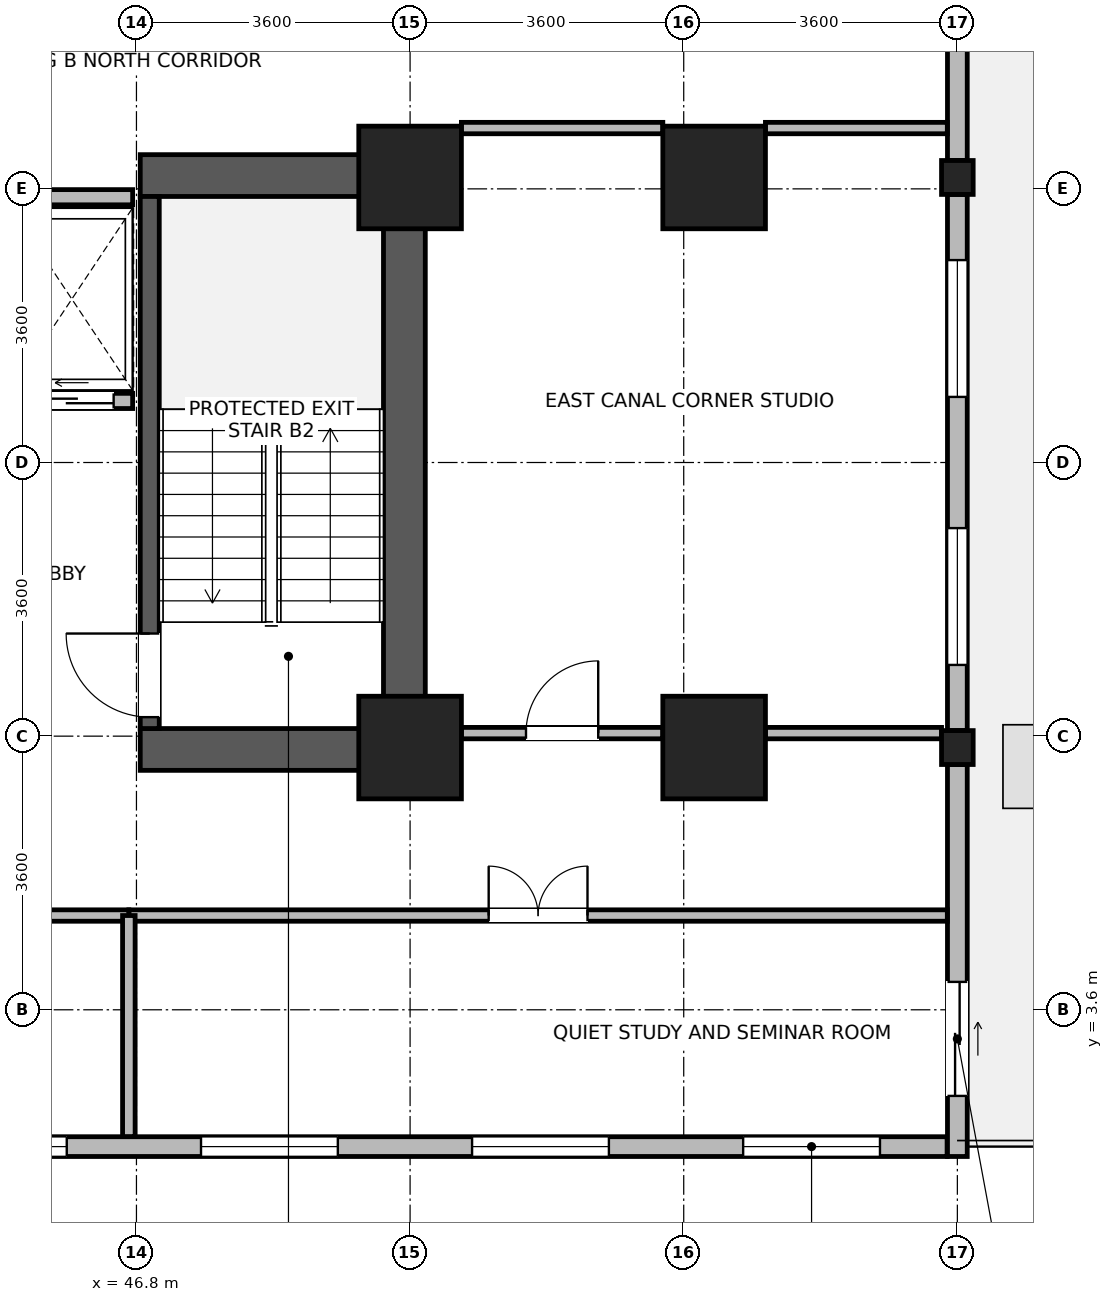
"""IFC4 building model, lengths in metres.
Left out: names, types, materials, properties, quantities, classifications, styles, units other than length and angle.
Written with IfcOpenShell. Run it as: python <this file> out.ifc"""

import sys

from ifc_helpers import new_model, si_unit, direction, frame, frame_2d, origin, origin_2d, place, context, subcontext, project, spatial, rectangle, i_section, extrude, source, transform, mapped, element, fill, save


model = new_model("IFC4")
c1 = context("Model", 3, precision=1e-05, world=origin(), true_north=direction((0.0, 1.0)))
c2 = subcontext(c1, "Body", "Model", "MODEL_VIEW")
j1 = project(units=[si_unit("LENGTHUNIT", "METRE"), si_unit("PLANEANGLEUNIT", "RADIAN")], contexts=[c1])
p1 = place(None, origin())
s1 = spatial("IfcSite", under=j1, at=p1, CompositionType="ELEMENT")
p2 = place(p1, origin())
s2 = spatial("IfcBuilding", under=s1, at=p2, CompositionType="ELEMENT")
p3 = place(p2, frame((0.0, 0.0, 47.5)))
s3 = spatial("IfcBuildingStorey", under=s2, at=p3, CompositionType="ELEMENT", Elevation=47.5)
p4 = place(p3, frame((50.325, 6.75, 0.0), z_axis=(0.0, 0.0, 1.0), x_axis=(0.0, 1.0, 0.0)))
e1 = element("IfcWall", 1, at=p4, inside=s3, PredefinedType="SHEAR", context=c2, shape_type="SweptSolid", body=[
    extrude(rectangle(XDim=8.1, YDim=0.55, at=frame_2d((4.05, 0.0))), origin(), (0.0, 0.0, 1.0), 3.45),
])
for number, where, z_axis, x_axis in (
    (2, (46.85, 7.025, 0.0), (0.0, 0.0, 1.0), (1.0, 0.0, 0.0)),
    (3, (46.85, 14.575, 0.0), (0.0, 0.0, 1.0), (1.0, 0.0, 0.0)),
):
    element("IfcWall", number, at=place(p3, frame(where, z_axis=z_axis, x_axis=x_axis)), inside=s3, PredefinedType="SHEAR", context=c2, shape_type="SweptSolid", body=[
        extrude(rectangle(XDim=3.2, YDim=0.55, at=frame_2d((1.6, 0.0))), origin(), (0.0, 0.0, 1.0), 3.45),
    ])
p5 = place(p3, frame((46.975, 7.3, 0.0), z_axis=(0.0, 0.0, 1.0), x_axis=(0.0, 1.0, 0.0)))
e4 = element("IfcWall", 4, at=p5, inside=s3, PredefinedType="SHEAR", context=c2, shape_type="SweptSolid", body=[
    extrude(rectangle(XDim=7.0, YDim=0.25, at=frame_2d((3.5, 0.0))), origin(), (0.0, 0.0, 1.0), 3.45),
])
p6 = place(p5, frame((0.15, 0.0, 0.0)))
e5 = element("IfcOpeningElement", 5, at=p6, cuts=e4, PredefinedType="OPENING", context=c2, shape_type="SweptSolid", body=[
    extrude(rectangle(XDim=1.1, YDim=2.08, at=frame_2d((0.55, 1.04))), frame((0.0, 0.135, 0.0), z_axis=(0.0, -1.0, 0.0), x_axis=(1.0, 0.0, 0.0)), (0.0, 0.0, 1.0), 0.27),
])
m1 = source(origin(), c2, "Body", "SweptSolid", [
    extrude(rectangle(XDim=1.35, YDim=1.35, at=origin_2d()), origin(), (0.0, 0.0, 1.0), 3.7),
])
for number, where, z_axis, x_axis in (
    (6, (50.4, 7.05, 0.0), (0.0, 0.0, 1.0), (1.0, 0.0, 0.0)),
    (7, (50.4, 14.55, 0.0), (0.0, 0.0, 1.0), (1.0, 0.0, 0.0)),
    (8, (54.4, 7.05, 0.0), (0.0, 0.0, 1.0), (1.0, 0.0, 0.0)),
    (9, (54.4, 14.55, 0.0), (0.0, 0.0, 1.0), (1.0, 0.0, 0.0)),
):
    element("IfcColumn", number, at=place(p3, frame(where, z_axis=z_axis, x_axis=x_axis)), inside=s3, PredefinedType="COLUMN", context=c2, shape_type="MappedRepresentation", body=[
        mapped(m1, transform((0.0, 0.0, 0.0), x_axis=(1.0, 0.0, 0.0), y_axis=(0.0, 1.0, 0.0), z_axis=(0.0, 0.0, 1.0), scale=1.0)),
    ])
m2 = source(origin(), c2, "Body", "SweptSolid", [
    extrude(i_section(OverallWidth=0.416, OverallDepth=0.446, WebThickness=0.029, FlangeThickness=0.04, FilletRadius=0.015, at=origin_2d()), origin(), (0.0, 0.0, 1.0), 3.7),
])
for number, where, z_axis, x_axis in (
    (10, (57.6, 7.05, 0.0), (0.0, 0.0, 1.0), (1.0, 0.0, 0.0)),
    (11, (57.6, 14.55, 0.0), (0.0, 0.0, 1.0), (1.0, 0.0, 0.0)),
):
    element("IfcColumn", number, at=place(p3, frame(where, z_axis=z_axis, x_axis=x_axis)), inside=s3, PredefinedType="COLUMN", context=c2, shape_type="MappedRepresentation", body=[
        mapped(m2, transform((0.0, 0.0, 0.0), x_axis=(1.0, 0.0, 0.0), y_axis=(0.0, 1.0, 0.0), z_axis=(0.0, 0.0, 1.0), scale=1.0)),
    ])
p7 = place(p3, frame((57.465, 1.8, 0.0), z_axis=(0.0, 0.0, 1.0), x_axis=(-1.0, 0.0, 0.0)))
e12 = element("IfcWall", 12, at=p7, inside=s3, PredefinedType="STANDARD", context=c2, shape_type="SweptSolid", body=[
    extrude(rectangle(XDim=28.53, YDim=0.26, at=frame_2d((14.265, 0.0))), origin(), (0.0, 0.0, 1.0), 3.43),
])
p8 = place(p7, frame((0.883, 0.0, 0.85)))
e13 = element("IfcOpeningElement", 13, at=p8, cuts=e12, PredefinedType="OPENING", context=c2, shape_type="SweptSolid", body=[
    extrude(rectangle(XDim=1.8, YDim=1.85, at=frame_2d((0.9, 0.925))), frame((0.0, 0.14, 0.0), z_axis=(0.0, -1.0, 0.0), x_axis=(1.0, 0.0, 0.0)), (0.0, 0.0, 1.0), 0.28),
])
p9 = place(p7, frame((4.449, 0.0, 0.85)))
e14 = element("IfcOpeningElement", 14, at=p9, cuts=e12, PredefinedType="OPENING", context=c2, shape_type="SweptSolid", body=[
    extrude(rectangle(XDim=1.8, YDim=1.85, at=frame_2d((0.9, 0.925))), frame((0.0, 0.14, 0.0), z_axis=(0.0, -1.0, 0.0), x_axis=(1.0, 0.0, 0.0)), (0.0, 0.0, 1.0), 0.28),
])
p10 = place(p7, frame((8.016, 0.0, 0.85)))
e15 = element("IfcOpeningElement", 15, at=p10, cuts=e12, PredefinedType="OPENING", context=c2, shape_type="SweptSolid", body=[
    extrude(rectangle(XDim=1.8, YDim=1.85, at=frame_2d((0.9, 0.925))), frame((0.0, 0.14, 0.0), z_axis=(0.0, -1.0, 0.0), x_axis=(1.0, 0.0, 0.0)), (0.0, 0.0, 1.0), 0.28),
])
p11 = place(p7, frame((11.582, 0.0, 0.85)))
e16 = element("IfcOpeningElement", 16, at=p11, cuts=e12, PredefinedType="OPENING", context=c2, shape_type="SweptSolid", body=[
    extrude(rectangle(XDim=1.8, YDim=1.85, at=frame_2d((0.9, 0.925))), frame((0.0, 0.14, 0.0), z_axis=(0.0, -1.0, 0.0), x_axis=(1.0, 0.0, 0.0)), (0.0, 0.0, 1.0), 0.28),
])
p12 = place(p7, frame((15.148, 0.0, 0.85)))
e17 = element("IfcOpeningElement", 17, at=p12, cuts=e12, PredefinedType="OPENING", context=c2, shape_type="SweptSolid", body=[
    extrude(rectangle(XDim=1.8, YDim=1.85, at=frame_2d((0.9, 0.925))), frame((0.0, 0.14, 0.0), z_axis=(0.0, -1.0, 0.0), x_axis=(1.0, 0.0, 0.0)), (0.0, 0.0, 1.0), 0.28),
])
p13 = place(p7, frame((22.281, 0.0, 0.85)))
e18 = element("IfcOpeningElement", 18, at=p13, cuts=e12, PredefinedType="OPENING", context=c2, shape_type="SweptSolid", body=[
    extrude(rectangle(XDim=1.8, YDim=1.85, at=frame_2d((0.9, 0.925))), frame((0.0, 0.14, 0.0), z_axis=(0.0, -1.0, 0.0), x_axis=(1.0, 0.0, 0.0)), (0.0, 0.0, 1.0), 0.28),
])
p14 = place(p7, frame((25.847, 0.0, 0.85)))
e19 = element("IfcOpeningElement", 19, at=p14, cuts=e12, PredefinedType="OPENING", context=c2, shape_type="SweptSolid", body=[
    extrude(rectangle(XDim=1.8, YDim=1.85, at=frame_2d((0.9, 0.925))), frame((0.0, 0.14, 0.0), z_axis=(0.0, -1.0, 0.0), x_axis=(1.0, 0.0, 0.0)), (0.0, 0.0, 1.0), 0.28),
])
p15 = place(p3, frame((57.6, 6.826, 0.0), z_axis=(0.0, 0.0, 1.0), x_axis=(0.0, -1.0, 0.0)))
e20 = element("IfcWall", 20, at=p15, inside=s3, PredefinedType="STANDARD", context=c2, shape_type="SweptSolid", body=[
    extrude(rectangle(XDim=5.156, YDim=0.26, at=frame_2d((2.578, 0.0))), origin(), (0.0, 0.0, 1.0), 3.43),
])
p16 = place(p15, frame((2.859, 0.0, 0.0)))
e21 = element("IfcOpeningElement", 21, at=p16, cuts=e20, PredefinedType="OPENING", context=c2, shape_type="SweptSolid", body=[
    extrude(rectangle(XDim=1.5, YDim=2.15, at=frame_2d((0.75, 1.075))), frame((0.0, 0.14, 0.0), z_axis=(0.0, -1.0, 0.0), x_axis=(1.0, 0.0, 0.0)), (0.0, 0.0, 1.0), 0.28),
])
p17 = place(p3, frame((57.6, 14.326, 0.0), z_axis=(0.0, 0.0, 1.0), x_axis=(0.0, -1.0, 0.0)))
e22 = element("IfcWall", 22, at=p17, inside=s3, PredefinedType="STANDARD", context=c2, shape_type="SweptSolid", body=[
    extrude(rectangle(XDim=7.052, YDim=0.26, at=frame_2d((3.526, 0.0))), origin(), (0.0, 0.0, 1.0), 2.93),
])
p18 = place(p17, frame((0.863, 0.0, 0.85)))
e23 = element("IfcOpeningElement", 23, at=p18, cuts=e22, PredefinedType="OPENING", context=c2, shape_type="SweptSolid", body=[
    extrude(rectangle(XDim=1.8, YDim=1.85, at=frame_2d((0.9, 0.925))), frame((0.0, 0.14, 0.0), z_axis=(0.0, -1.0, 0.0), x_axis=(1.0, 0.0, 0.0)), (0.0, 0.0, 1.0), 0.28),
])
p19 = place(p17, frame((4.389, 0.0, 0.85)))
e24 = element("IfcOpeningElement", 24, at=p19, cuts=e22, PredefinedType="OPENING", context=c2, shape_type="SweptSolid", body=[
    extrude(rectangle(XDim=1.8, YDim=1.85, at=frame_2d((0.9, 0.925))), frame((0.0, 0.14, 0.0), z_axis=(0.0, -1.0, 0.0), x_axis=(1.0, 0.0, 0.0)), (0.0, 0.0, 1.0), 0.28),
])
p20 = place(p3, frame((57.6, 21.376, 0.0), z_axis=(0.0, 0.0, 1.0), x_axis=(0.0, -1.0, 0.0)))
e25 = element("IfcWall", 25, at=p20, inside=s3, PredefinedType="STANDARD", context=c2, shape_type="SweptSolid", body=[
    extrude(rectangle(XDim=6.602, YDim=0.26, at=frame_2d((3.301, 0.0))), origin(), (0.0, 0.0, 1.0), 2.93),
])
p21 = place(p20, frame((0.75, 0.0, 0.85)))
e26 = element("IfcOpeningElement", 26, at=p21, cuts=e25, PredefinedType="OPENING", context=c2, shape_type="SweptSolid", body=[
    extrude(rectangle(XDim=1.8, YDim=1.85, at=frame_2d((0.9, 0.925))), frame((0.0, 0.14, 0.0), z_axis=(0.0, -1.0, 0.0), x_axis=(1.0, 0.0, 0.0)), (0.0, 0.0, 1.0), 0.28),
])
p22 = place(p3, frame((45.15, 11.61, 0.0), z_axis=(0.0, 0.0, 1.0), x_axis=(1.0, 0.0, 0.0)))
e27 = element("IfcWall", 27, at=p22, inside=s3, PredefinedType="PARTITIONING", context=c2, shape_type="SweptSolid", body=[
    extrude(rectangle(XDim=1.6, YDim=0.2, at=frame_2d((0.8, 0.0))), origin(), (0.0, 0.0, 1.0), 3.43),
])
p23 = place(p22, frame((0.25, 0.0, 0.0)))
e28 = element("IfcOpeningElement", 28, at=p23, cuts=e27, PredefinedType="OPENING", context=c2, shape_type="SweptSolid", body=[
    extrude(rectangle(XDim=1.1, YDim=2.12, at=frame_2d((0.55, 1.06))), frame((0.0, 0.11, 0.0), z_axis=(0.0, -1.0, 0.0), x_axis=(1.0, 0.0, 0.0)), (0.0, 0.0, 1.0), 0.22),
])
p24 = place(p3, frame((45.15, 14.29, 0.0), z_axis=(0.0, 0.0, 1.0), x_axis=(1.0, 0.0, 0.0)))
e29 = element("IfcWall", 29, at=p24, inside=s3, PredefinedType="PARTITIONING", context=c2, shape_type="SweptSolid", body=[
    extrude(rectangle(XDim=1.6, YDim=0.2, at=frame_2d((0.8, 0.0))), origin(), (0.0, 0.0, 1.0), 2.23),
])
p25 = place(p3, frame((46.7, 4.84, 0.0), z_axis=(0.0, 0.0, 1.0), x_axis=(1.0, 0.0, 0.0)))
e30 = element("IfcWall", 30, at=p25, inside=s3, PredefinedType="PARTITIONING", context=c2, shape_type="SweptSolid", body=[
    extrude(rectangle(XDim=10.768, YDim=0.15, at=frame_2d((5.384, 0.0))), origin(), (0.0, 0.0, 1.0), 3.43),
])
p26 = place(p25, frame((4.734, 0.0, 0.0)))
e31 = element("IfcOpeningElement", 31, at=p26, cuts=e30, PredefinedType="OPENING", context=c2, shape_type="SweptSolid", body=[
    extrude(rectangle(XDim=1.3, YDim=2.12, at=frame_2d((0.65, 1.06))), frame((0.0, 0.085, 0.0), z_axis=(0.0, -1.0, 0.0), x_axis=(1.0, 0.0, 0.0)), (0.0, 0.0, 1.0), 0.17),
])
p27 = place(p3, frame((37.5, 4.84, 0.0), z_axis=(0.0, 0.0, 1.0), x_axis=(1.0, 0.0, 0.0)))
e32 = element("IfcWall", 32, at=p27, inside=s3, PredefinedType="PARTITIONING", context=c2, shape_type="SweptSolid", body=[
    extrude(rectangle(XDim=9.2, YDim=0.15, at=frame_2d((4.6, 0.0))), origin(), (0.0, 0.0, 1.0), 3.43),
])
p28 = place(p27, frame((4.125, 0.0, 0.0)))
e33 = element("IfcOpeningElement", 33, at=p28, cuts=e32, PredefinedType="OPENING", context=c2, shape_type="SweptSolid", body=[
    extrude(rectangle(XDim=0.95, YDim=2.1, at=frame_2d((0.475, 1.05))), frame((0.0, 0.085, 0.0), z_axis=(0.0, -1.0, 0.0), x_axis=(1.0, 0.0, 0.0)), (0.0, 0.0, 1.0), 0.17),
])
p29 = place(p3, frame((51.075, 7.24, 0.0), z_axis=(0.0, 0.0, 1.0), x_axis=(1.0, 0.0, 0.0)))
e34 = element("IfcWall", 34, at=p29, inside=s3, PredefinedType="PARTITIONING", context=c2, shape_type="SweptSolid", body=[
    extrude(rectangle(XDim=2.65, YDim=0.15, at=frame_2d((1.325, 0.0))), origin(), (0.0, 0.0, 1.0), 2.78),
])
p30 = place(p29, frame((0.85, 0.0, 0.0)))
e35 = element("IfcOpeningElement", 35, at=p30, cuts=e34, PredefinedType="OPENING", context=c2, shape_type="SweptSolid", body=[
    extrude(rectangle(XDim=0.95, YDim=2.1, at=frame_2d((0.475, 1.05))), frame((0.0, 0.085, 0.0), z_axis=(0.0, -1.0, 0.0), x_axis=(1.0, 0.0, 0.0)), (0.0, 0.0, 1.0), 0.17),
])
p31 = place(p3, frame((55.075, 7.24, 0.0), z_axis=(0.0, 0.0, 1.0), x_axis=(1.0, 0.0, 0.0)))
e36 = element("IfcWall", 36, at=p31, inside=s3, PredefinedType="PARTITIONING", context=c2, shape_type="SweptSolid", body=[
    extrude(rectangle(XDim=2.317, YDim=0.15, at=frame_2d((1.159, 0.0))), origin(), (0.0, 0.0, 1.0), 2.78),
])
p32 = place(p3, frame((51.075, 15.2, 0.0), z_axis=(0.0, 0.0, 1.0), x_axis=(1.0, 0.0, 0.0)))
e37 = element("IfcWall", 37, at=p32, inside=s3, PredefinedType="PARTITIONING", context=c2, shape_type="SweptSolid", body=[
    extrude(rectangle(XDim=2.65, YDim=0.15, at=frame_2d((1.325, 0.0))), origin(), (0.0, 0.0, 1.0), 3.43),
])
p33 = place(p3, frame((55.075, 15.2, 0.0), z_axis=(0.0, 0.0, 1.0), x_axis=(1.0, 0.0, 0.0)))
e38 = element("IfcWall", 38, at=p33, inside=s3, PredefinedType="PARTITIONING", context=c2, shape_type="SweptSolid", body=[
    extrude(rectangle(XDim=2.393, YDim=0.15, at=frame_2d((1.197, 0.0))), origin(), (0.0, 0.0, 1.0), 3.43),
])
p34 = place(p3, frame((46.7, 1.932, 0.0), z_axis=(0.0, 0.0, 1.0), x_axis=(0.0, 1.0, 0.0)))
e39 = element("IfcWall", 39, at=p34, inside=s3, PredefinedType="PARTITIONING", context=c2, shape_type="SweptSolid", body=[
    extrude(rectangle(XDim=2.908, YDim=0.165, at=frame_2d((1.454, 0.0))), origin(), (0.0, 0.0, 1.0), 3.43),
])
p35 = place(p8, origin())
e40 = element("IfcWindow", 40, at=p35, inside=s3, PartitioningType="SINGLE_PANEL", PredefinedType="WINDOW", context=c2, shape_type="SweptSolid", body=[
    extrude(rectangle(XDim=1.8, YDim=1.85, at=frame_2d((0.9, 0.925))), frame((0.0, 0.03, 0.0), z_axis=(0.0, -1.0, 0.0), x_axis=(1.0, 0.0, 0.0)), (0.0, 0.0, 1.0), 0.06),
])
fill(e13, e40)
p36 = place(p9, origin())
e41 = element("IfcWindow", 41, at=p36, inside=s3, PartitioningType="SINGLE_PANEL", PredefinedType="WINDOW", context=c2, shape_type="SweptSolid", body=[
    extrude(rectangle(XDim=1.8, YDim=1.85, at=frame_2d((0.9, 0.925))), frame((0.0, 0.03, 0.0), z_axis=(0.0, -1.0, 0.0), x_axis=(1.0, 0.0, 0.0)), (0.0, 0.0, 1.0), 0.06),
])
fill(e14, e41)
p37 = place(p10, origin())
e42 = element("IfcWindow", 42, at=p37, inside=s3, PartitioningType="SINGLE_PANEL", PredefinedType="WINDOW", context=c2, shape_type="SweptSolid", body=[
    extrude(rectangle(XDim=1.8, YDim=1.85, at=frame_2d((0.9, 0.925))), frame((0.0, 0.03, 0.0), z_axis=(0.0, -1.0, 0.0), x_axis=(1.0, 0.0, 0.0)), (0.0, 0.0, 1.0), 0.06),
])
fill(e15, e42)
p38 = place(p11, origin())
e43 = element("IfcWindow", 43, at=p38, inside=s3, PartitioningType="SINGLE_PANEL", PredefinedType="WINDOW", context=c2, shape_type="SweptSolid", body=[
    extrude(rectangle(XDim=1.8, YDim=1.85, at=frame_2d((0.9, 0.925))), frame((0.0, 0.03, 0.0), z_axis=(0.0, -1.0, 0.0), x_axis=(1.0, 0.0, 0.0)), (0.0, 0.0, 1.0), 0.06),
])
fill(e16, e43)
p39 = place(p16, origin())
e44 = element("IfcDoor", 44, at=p39, inside=s3, OperationType="SLIDING_TO_LEFT", PredefinedType="DOOR", context=c2, shape_type="SweptSolid", body=[
    extrude(rectangle(XDim=1.5, YDim=2.15, at=frame_2d((0.75, 1.075))), frame((0.0, 0.025, 0.0), z_axis=(0.0, -1.0, 0.0), x_axis=(1.0, 0.0, 0.0)), (0.0, 0.0, 1.0), 0.05),
])
fill(e21, e44)
p40 = place(p18, origin())
e45 = element("IfcWindow", 45, at=p40, inside=s3, PartitioningType="SINGLE_PANEL", PredefinedType="WINDOW", context=c2, shape_type="SweptSolid", body=[
    extrude(rectangle(XDim=1.8, YDim=1.85, at=frame_2d((0.9, 0.925))), frame((0.0, 0.03, 0.0), z_axis=(0.0, -1.0, 0.0), x_axis=(1.0, 0.0, 0.0)), (0.0, 0.0, 1.0), 0.06),
])
fill(e23, e45)
p41 = place(p19, origin())
e46 = element("IfcWindow", 46, at=p41, inside=s3, PartitioningType="SINGLE_PANEL", PredefinedType="WINDOW", context=c2, shape_type="SweptSolid", body=[
    extrude(rectangle(XDim=1.8, YDim=1.85, at=frame_2d((0.9, 0.925))), frame((0.0, 0.03, 0.0), z_axis=(0.0, -1.0, 0.0), x_axis=(1.0, 0.0, 0.0)), (0.0, 0.0, 1.0), 0.06),
])
fill(e24, e46)
p42 = place(p6, origin())
e47 = element("IfcDoor", 47, at=p42, inside=s3, OperationType="SINGLE_SWING_RIGHT", PredefinedType="DOOR", context=c2, shape_type="SweptSolid", body=[
    extrude(rectangle(XDim=1.1, YDim=2.08, at=frame_2d((0.55, 1.04))), frame((0.0, 0.025, 0.0), z_axis=(0.0, -1.0, 0.0), x_axis=(1.0, 0.0, 0.0)), (0.0, 0.0, 1.0), 0.05),
])
fill(e5, e47)
p43 = place(p23, origin())
e48 = element("IfcDoor", 48, at=p43, inside=s3, OperationType="SLIDING_TO_LEFT", PredefinedType="DOOR", context=c2, shape_type="SweptSolid", body=[
    extrude(rectangle(XDim=1.1, YDim=2.12, at=frame_2d((0.55, 1.06))), frame((0.0, 0.025, 0.0), z_axis=(0.0, -1.0, 0.0), x_axis=(1.0, 0.0, 0.0)), (0.0, 0.0, 1.0), 0.05),
])
fill(e28, e48)
p44 = place(p26, origin())
e49 = element("IfcDoor", 49, at=p44, inside=s3, OperationType="DOUBLE_DOOR_SINGLE_SWING", PredefinedType="DOOR", context=c2, shape_type="SweptSolid", body=[
    extrude(rectangle(XDim=1.3, YDim=2.12, at=frame_2d((0.65, 1.06))), frame((0.0, 0.025, 0.0), z_axis=(0.0, -1.0, 0.0), x_axis=(1.0, 0.0, 0.0)), (0.0, 0.0, 1.0), 0.05),
])
fill(e31, e49)
p45 = place(p30, origin())
e50 = element("IfcDoor", 50, at=p45, inside=s3, OperationType="SINGLE_SWING_RIGHT", PredefinedType="DOOR", context=c2, shape_type="SweptSolid", body=[
    extrude(rectangle(XDim=0.95, YDim=2.1, at=frame_2d((0.475, 1.05))), frame((0.0, 0.025, 0.0), z_axis=(0.0, -1.0, 0.0), x_axis=(1.0, 0.0, 0.0)), (0.0, 0.0, 1.0), 0.05),
])
fill(e35, e50)
save(model, sys.argv[1])
